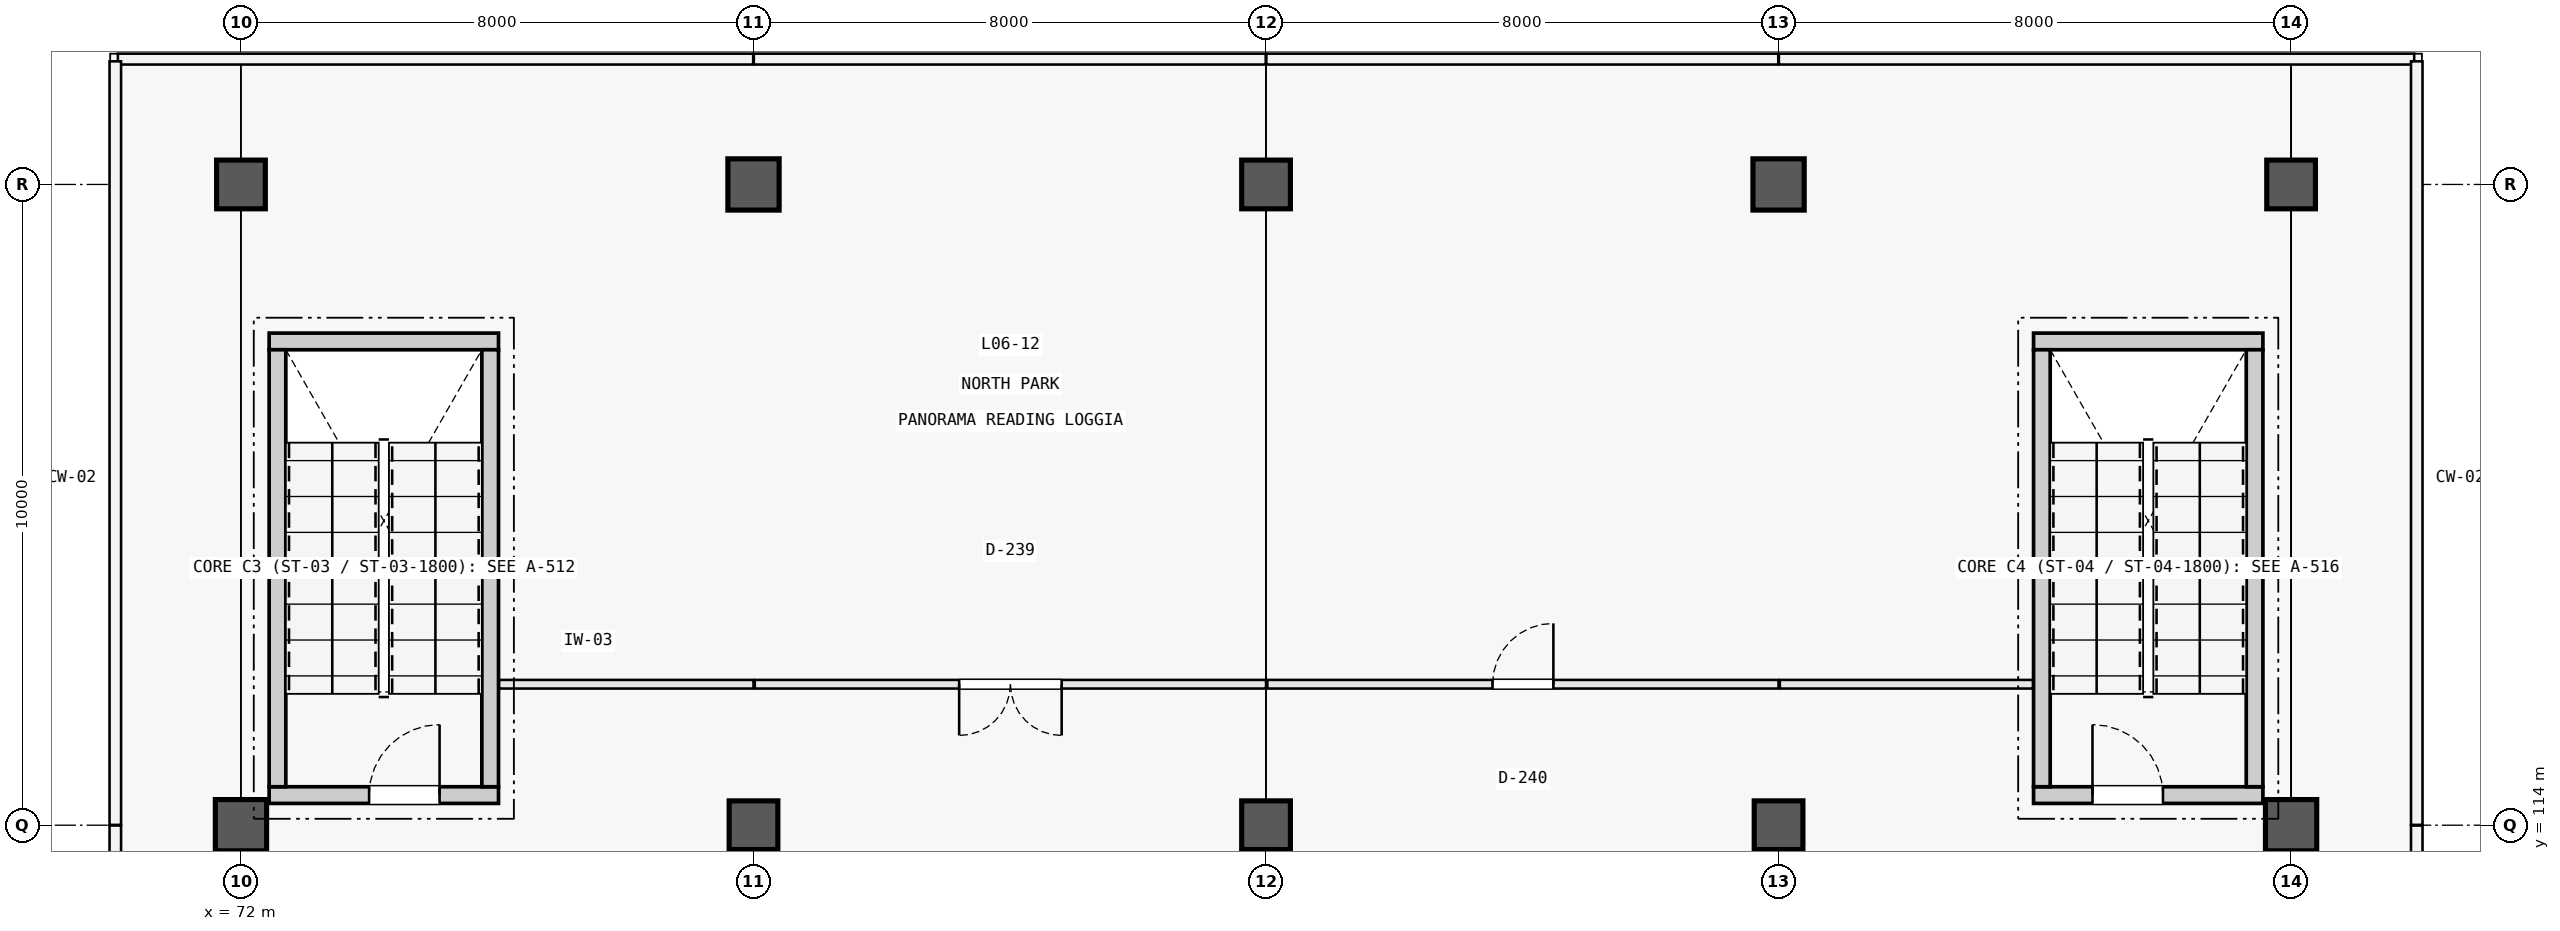
"""IFC4 building model, lengths in metres.
Left out: names, types, materials, properties, quantities, classifications, styles, units other than length and angle.
Written with IfcOpenShell. Run it as: python <this file> out.ifc"""

import sys

from ifc_helpers import new_model, si_unit, direction, frame, frame_2d, origin, origin_2d, place, context, subcontext, project, spatial, rectangle, circle, extrude, element, fill, save


model = new_model("IFC4")
c1 = context("Model", 3, precision=1e-05, world=origin(), true_north=direction((0.0, 1.0)))
c2 = subcontext(c1, "Body", "Model", "MODEL_VIEW")
j1 = project(units=[si_unit("LENGTHUNIT", "METRE"), si_unit("PLANEANGLEUNIT", "RADIAN")], contexts=[c1])
p1 = place(None, origin())
s1 = spatial("IfcSite", under=j1, at=p1, CompositionType="ELEMENT")
p2 = place(p1, origin())
s2 = spatial("IfcBuilding", under=s1, at=p2, CompositionType="ELEMENT")
p3 = place(p2, frame((0.0, 0.0, 24.9)))
s3 = spatial("IfcBuildingStorey", under=s2, at=p3, CompositionType="ELEMENT", Elevation=24.9)
p4 = place(p3, frame((72.0, 114.0, 0.0), z_axis=(0.0, 0.0, 1.0), x_axis=(1.0, 0.0, 0.0)))
e1 = element("IfcColumn", 1, at=p4, inside=s3, PredefinedType="COLUMN", context=c2, shape_type="SweptSolid", body=[
    extrude(rectangle(XDim=0.8, YDim=0.8, at=origin_2d()), origin(), (0.0, 0.0, 1.0), 5.4),
])
for number, where, z_axis, x_axis in (
    (2, (72.0, 124.0, 0.0), (0.0, 0.0, 1.0), (1.0, 0.0, 0.0)),
    (3, (80.0, 114.0, 0.0), (0.0, 0.0, 1.0), (1.0, 0.0, 0.0)),
):
    element("IfcColumn", number, at=place(p3, frame(where, z_axis=z_axis, x_axis=x_axis)), inside=s3, PredefinedType="COLUMN", context=c2, shape_type="SweptSolid", body=[
        extrude(circle(Radius=0.38, at=origin_2d()), origin(), (0.0, 0.0, 1.0), 5.4),
    ])
p5 = place(p3, frame((80.0, 124.0, 0.0), z_axis=(0.0, 0.0, 1.0), x_axis=(1.0, 0.0, 0.0)))
e4 = element("IfcColumn", 4, at=p5, inside=s3, PredefinedType="COLUMN", context=c2, shape_type="SweptSolid", body=[
    extrude(rectangle(XDim=0.8, YDim=0.8, at=origin_2d()), origin(), (0.0, 0.0, 1.0), 5.4),
])
for number, where, z_axis, x_axis in (
    (5, (88.0, 114.0, 0.0), (0.0, 0.0, 1.0), (1.0, 0.0, 0.0)),
    (6, (88.0, 124.0, 0.0), (0.0, 0.0, 1.0), (1.0, 0.0, 0.0)),
    (7, (96.0, 114.0, 0.0), (0.0, 0.0, 1.0), (1.0, 0.0, 0.0)),
):
    element("IfcColumn", number, at=place(p3, frame(where, z_axis=z_axis, x_axis=x_axis)), inside=s3, PredefinedType="COLUMN", context=c2, shape_type="SweptSolid", body=[
        extrude(circle(Radius=0.38, at=origin_2d()), origin(), (0.0, 0.0, 1.0), 5.4),
    ])
for number, where, z_axis, x_axis in (
    (8, (96.0, 124.0, 0.0), (0.0, 0.0, 1.0), (1.0, 0.0, 0.0)),
    (9, (104.0, 114.0, 0.0), (0.0, 0.0, 1.0), (1.0, 0.0, 0.0)),
):
    element("IfcColumn", number, at=place(p3, frame(where, z_axis=z_axis, x_axis=x_axis)), inside=s3, PredefinedType="COLUMN", context=c2, shape_type="SweptSolid", body=[
        extrude(rectangle(XDim=0.8, YDim=0.8, at=origin_2d()), origin(), (0.0, 0.0, 1.0), 5.4),
    ])
p6 = place(p3, frame((104.0, 124.0, 0.0), z_axis=(0.0, 0.0, 1.0), x_axis=(1.0, 0.0, 0.0)))
e10 = element("IfcColumn", 10, at=p6, inside=s3, PredefinedType="COLUMN", context=c2, shape_type="SweptSolid", body=[
    extrude(circle(Radius=0.38, at=origin_2d()), origin(), (0.0, 0.0, 1.0), 5.4),
])
p7 = place(p3, frame((72.44, 114.47, 0.0), z_axis=(0.0, 0.0, 1.0), x_axis=(1.0, 0.0, 0.0)))
e11 = element("IfcWall", 11, at=p7, inside=s3, PredefinedType="SOLIDWALL", context=c2, shape_type="SweptSolid", body=[
    extrude(rectangle(XDim=3.58, YDim=0.26, at=frame_2d((1.79, 0.0))), origin(), (0.0, 0.0, 1.0), 5.4),
])
p8 = place(p7, frame((1.56, 0.0, 0.0)))
e12 = element("IfcOpeningElement", 12, at=p8, cuts=e11, PredefinedType="OPENING", context=c2, shape_type="SweptSolid", body=[
    extrude(rectangle(XDim=1.1, YDim=2.2, at=frame_2d((0.55, 1.1))), frame((0.0, 0.142, 0.0), z_axis=(0.0, -1.0, 0.0), x_axis=(1.0, 0.0, 0.0)), (0.0, 0.0, 1.0), 0.284),
])
p9 = place(p3, frame((72.44, 121.55, 0.0), z_axis=(0.0, 0.0, 1.0), x_axis=(1.0, 0.0, 0.0)))
e13 = element("IfcWall", 13, at=p9, inside=s3, PredefinedType="SOLIDWALL", context=c2, shape_type="SweptSolid", body=[
    extrude(rectangle(XDim=3.58, YDim=0.26, at=frame_2d((1.79, 0.0))), origin(), (0.0, 0.0, 1.0), 5.4),
])
for number, where, z_axis, x_axis in (
    (14, (72.57, 114.6, 0.0), (0.0, 0.0, 1.0), (0.0, 1.0, 0.0)),
    (15, (75.89, 114.6, 0.0), (0.0, 0.0, 1.0), (0.0, 1.0, 0.0)),
):
    element("IfcWall", number, at=place(p3, frame(where, z_axis=z_axis, x_axis=x_axis)), inside=s3, PredefinedType="SOLIDWALL", context=c2, shape_type="SweptSolid", body=[
        extrude(rectangle(XDim=6.82, YDim=0.26, at=frame_2d((3.41, 0.0))), origin(), (0.0, 0.0, 1.0), 5.4),
    ])
p10 = place(p3, frame((99.98, 114.47, 0.0), z_axis=(0.0, 0.0, 1.0), x_axis=(1.0, 0.0, 0.0)))
e16 = element("IfcWall", 16, at=p10, inside=s3, PredefinedType="SOLIDWALL", context=c2, shape_type="SweptSolid", body=[
    extrude(rectangle(XDim=3.58, YDim=0.26, at=frame_2d((1.79, 0.0))), origin(), (0.0, 0.0, 1.0), 5.4),
])
p11 = place(p10, frame((0.92, 0.0, 0.0)))
e17 = element("IfcOpeningElement", 17, at=p11, cuts=e16, PredefinedType="OPENING", context=c2, shape_type="SweptSolid", body=[
    extrude(rectangle(XDim=1.1, YDim=2.2, at=frame_2d((0.55, 1.1))), frame((0.0, 0.142, 0.0), z_axis=(0.0, -1.0, 0.0), x_axis=(1.0, 0.0, 0.0)), (0.0, 0.0, 1.0), 0.284),
])
p12 = place(p3, frame((99.98, 121.55, 0.0), z_axis=(0.0, 0.0, 1.0), x_axis=(1.0, 0.0, 0.0)))
e18 = element("IfcWall", 18, at=p12, inside=s3, PredefinedType="SOLIDWALL", context=c2, shape_type="SweptSolid", body=[
    extrude(rectangle(XDim=3.58, YDim=0.26, at=frame_2d((1.79, 0.0))), origin(), (0.0, 0.0, 1.0), 5.4),
])
for number, where, z_axis, x_axis in (
    (19, (100.11, 114.6, 0.0), (0.0, 0.0, 1.0), (0.0, 1.0, 0.0)),
    (20, (103.43, 114.6, 0.0), (0.0, 0.0, 1.0), (0.0, 1.0, 0.0)),
):
    element("IfcWall", number, at=place(p3, frame(where, z_axis=z_axis, x_axis=x_axis)), inside=s3, PredefinedType="SOLIDWALL", context=c2, shape_type="SweptSolid", body=[
        extrude(rectangle(XDim=6.82, YDim=0.26, at=frame_2d((3.41, 0.0))), origin(), (0.0, 0.0, 1.0), 5.4),
    ])
p13 = place(p3, frame((76.03, 116.2, 0.0), z_axis=(0.0, 0.0, 1.0), x_axis=(1.0, 0.0, 0.0)))
e21 = element("IfcWall", 21, at=p13, inside=s3, PredefinedType="PARTITIONING", context=c2, shape_type="SweptSolid", body=[
    extrude(rectangle(XDim=3.97, YDim=0.135, at=frame_2d((1.985, 0.0))), origin(), (0.0, 0.0, 1.0), 3.99),
])
p14 = place(p3, frame((80.02, 116.2, 0.0), z_axis=(0.0, 0.0, 1.0), x_axis=(1.0, 0.0, 0.0)))
e22 = element("IfcWall", 22, at=p14, inside=s3, PredefinedType="PARTITIONING", context=c2, shape_type="SweptSolid", body=[
    extrude(rectangle(XDim=7.98, YDim=0.135, at=frame_2d((3.99, 0.0))), origin(), (0.0, 0.0, 1.0), 3.99),
])
p15 = place(p14, frame((3.19, 0.0, 0.0)))
e23 = element("IfcOpeningElement", 23, at=p15, cuts=e22, PredefinedType="OPENING", context=c2, shape_type="SweptSolid", body=[
    extrude(rectangle(XDim=1.6, YDim=2.2, at=frame_2d((0.8, 1.1))), frame((0.0, 0.08, 0.0), z_axis=(0.0, -1.0, 0.0), x_axis=(1.0, 0.0, 0.0)), (0.0, 0.0, 1.0), 0.159),
])
p16 = place(p3, frame((88.02, 116.2, 0.0), z_axis=(0.0, 0.0, 1.0), x_axis=(1.0, 0.0, 0.0)))
e24 = element("IfcWall", 24, at=p16, inside=s3, PredefinedType="PARTITIONING", context=c2, shape_type="SweptSolid", body=[
    extrude(rectangle(XDim=7.98, YDim=0.135, at=frame_2d((3.99, 0.0))), origin(), (0.0, 0.0, 1.0), 3.99),
])
p17 = place(p16, frame((3.515, 0.0, 0.0)))
e25 = element("IfcOpeningElement", 25, at=p17, cuts=e24, PredefinedType="OPENING", context=c2, shape_type="SweptSolid", body=[
    extrude(rectangle(XDim=0.95, YDim=2.15, at=frame_2d((0.475, 1.075))), frame((0.0, 0.08, 0.0), z_axis=(0.0, -1.0, 0.0), x_axis=(1.0, 0.0, 0.0)), (0.0, 0.0, 1.0), 0.159),
])
p18 = place(p3, frame((96.02, 116.2, 0.0), z_axis=(0.0, 0.0, 1.0), x_axis=(1.0, 0.0, 0.0)))
e26 = element("IfcWall", 26, at=p18, inside=s3, PredefinedType="PARTITIONING", context=c2, shape_type="SweptSolid", body=[
    extrude(rectangle(XDim=3.95, YDim=0.135, at=frame_2d((1.975, 0.0))), origin(), (0.0, 0.0, 1.0), 3.99),
])
p19 = place(p8, origin())
e27 = element("IfcDoor", 27, at=p19, inside=s3, OperationType="SINGLE_SWING_RIGHT", PredefinedType="DOOR", context=c2, shape_type="SweptSolid", body=[
    extrude(rectangle(XDim=1.1, YDim=2.2, at=frame_2d((0.55, 1.1))), frame((0.0, 0.025, 0.0), z_axis=(0.0, -1.0, 0.0), x_axis=(1.0, 0.0, 0.0)), (0.0, 0.0, 1.0), 0.05),
])
fill(e12, e27)
p20 = place(p11, origin())
e28 = element("IfcDoor", 28, at=p20, inside=s3, OperationType="SINGLE_SWING_LEFT", PredefinedType="DOOR", context=c2, shape_type="SweptSolid", body=[
    extrude(rectangle(XDim=1.1, YDim=2.2, at=frame_2d((0.55, 1.1))), frame((0.0, 0.025, 0.0), z_axis=(0.0, -1.0, 0.0), x_axis=(1.0, 0.0, 0.0)), (0.0, 0.0, 1.0), 0.05),
])
fill(e17, e28)
p21 = place(p15, frame((1.6, 0.0, 0.0), z_axis=(0.0, 0.0, 1.0), x_axis=(-1.0, 0.0, 0.0)))
e29 = element("IfcDoor", 29, at=p21, inside=s3, OperationType="DOUBLE_DOOR_SINGLE_SWING", PredefinedType="DOOR", context=c2, shape_type="SweptSolid", body=[
    extrude(rectangle(XDim=1.6, YDim=2.2, at=frame_2d((0.8, 1.1))), frame((0.0, 0.025, 0.0), z_axis=(0.0, -1.0, 0.0), x_axis=(1.0, 0.0, 0.0)), (0.0, 0.0, 1.0), 0.05),
])
fill(e23, e29)
p22 = place(p17, origin())
e30 = element("IfcDoor", 30, at=p22, inside=s3, OperationType="SINGLE_SWING_RIGHT", PredefinedType="DOOR", context=c2, shape_type="SweptSolid", body=[
    extrude(rectangle(XDim=0.95, YDim=2.15, at=frame_2d((0.475, 1.075))), frame((0.0, 0.025, 0.0), z_axis=(0.0, -1.0, 0.0), x_axis=(1.0, 0.0, 0.0)), (0.0, 0.0, 1.0), 0.05),
])
fill(e25, e30)
save(model, sys.argv[1])
